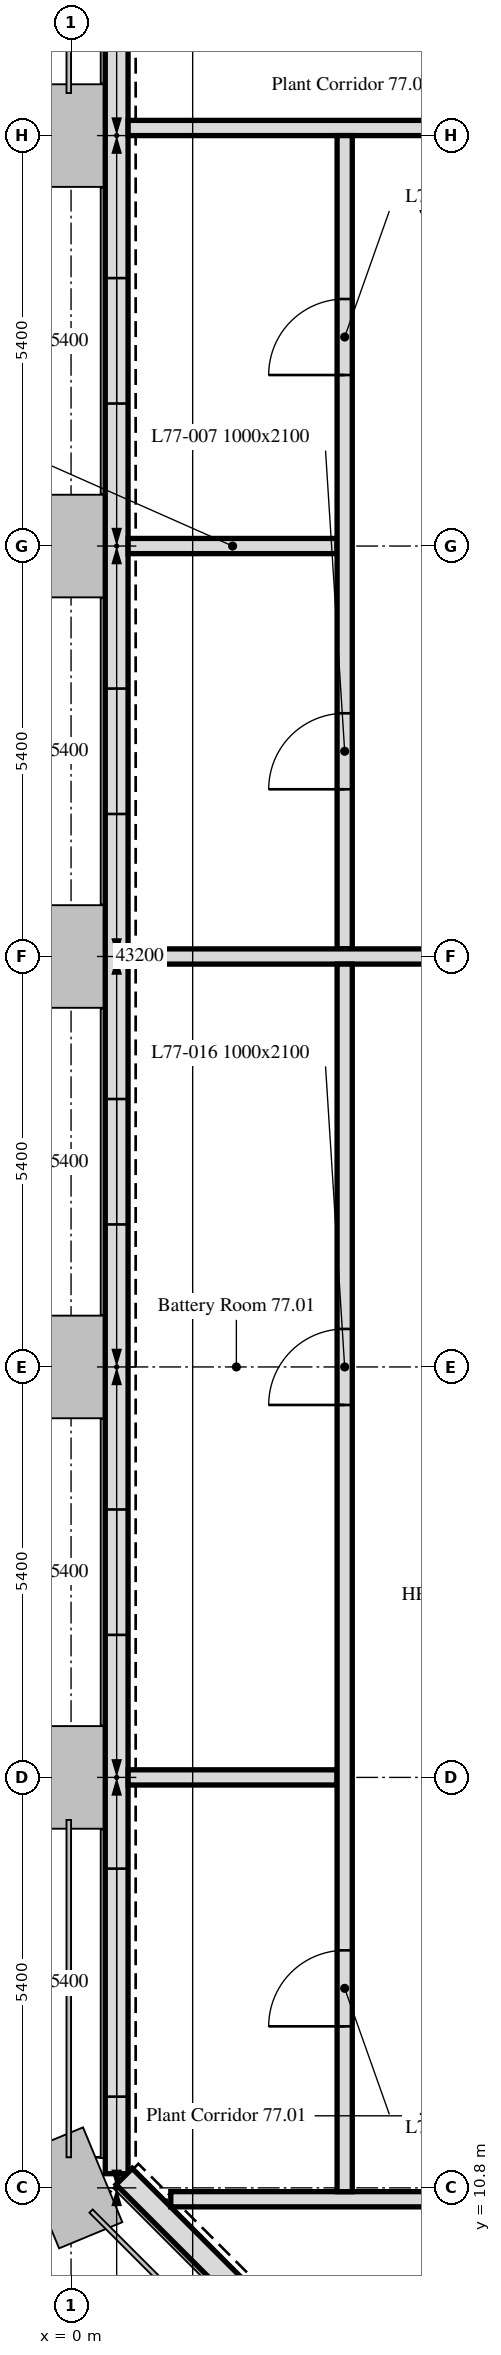
"""IFC4 building model, lengths in metres.
Left out: names, types, materials, properties, quantities, classifications, styles, units other than length and angle.
Written with IfcOpenShell. Run it as: python <this file> out.ifc"""

import sys

from ifc_helpers import new_model, si_unit, direction, frame, frame_2d, origin, place, context, subcontext, project, spatial, polyline, rectangle, outline, extrude, element, fill, save


model = new_model("IFC4")
c1 = context("Model", 3, precision=1e-05, world=origin(), true_north=direction((0.0, 1.0)))
c2 = subcontext(c1, "Body", "Model", "MODEL_VIEW")
j1 = project(units=[si_unit("LENGTHUNIT", "METRE"), si_unit("PLANEANGLEUNIT", "RADIAN")], contexts=[c1])
p1 = place(None, origin())
s1 = spatial("IfcSite", under=j1, at=p1, CompositionType="ELEMENT")
p2 = place(p1, origin())
s2 = spatial("IfcBuilding", under=s1, at=p2, CompositionType="ELEMENT")
p3 = place(p2, frame((0.0, 0.0, 308.2)))
s3 = spatial("IfcBuildingStorey", under=s2, at=p3, CompositionType="ELEMENT", Elevation=308.2)
p4 = place(p3, frame((0.6, 43.014, 0.0), z_axis=(0.0, 0.0, 1.0), x_axis=(0.0, -1.0, 0.0)))
e1 = element("IfcWall", 1, at=p4, inside=s3, PredefinedType="SOLIDWALL", context=c2, shape_type="SweptSolid", body=[
    extrude(outline(polyline([(0.0, 0.0), (32.027, 0.0), (32.027, 4.2), (31.434, 4.2), (30.841, 4.2), (30.248, 4.2), (29.655, 4.2), (29.062, 4.2), (28.469, 4.2), (27.875, 4.2), (27.282, 4.2), (26.689, 4.2), (26.096, 4.2), (25.503, 4.2), (24.91, 4.2), (24.317, 4.2), (23.724, 4.2), (23.131, 4.2), (22.538, 4.2), (21.945, 4.2), (21.352, 4.2), (20.758, 4.2), (20.165, 4.2), (19.572, 4.2), (18.979, 4.2), (18.386, 4.2), (17.793, 4.2), (17.2, 4.2), (16.607, 4.2), (16.014, 4.2), (15.42, 4.2), (14.827, 4.2), (14.234, 4.2), (13.641, 4.2), (13.048, 4.2), (12.455, 4.2), (11.862, 4.2), (11.269, 4.2), (10.676, 4.2), (10.083, 4.2), (9.49, 4.2), (8.896, 4.2), (8.303, 4.2), (7.71, 4.2), (7.117, 4.2), (6.524, 4.2), (5.931, 4.2), (5.338, 4.2), (4.745, 4.2), (4.152, 4.2), (3.559, 4.2), (2.966, 4.2), (2.372, 4.2), (1.779, 4.2), (1.186, 4.2), (0.593, 4.2), (0.0, 4.2), (0.0, 0.0)])), frame((0.0, 0.15, 0.0), z_axis=(0.0, -1.0, 0.0), x_axis=(1.0, 0.0, 0.0)), (0.0, 0.0, 1.0), 0.3),
])
p5 = place(p4, frame((1.014, 0.0, 0.6)))
e2 = element("IfcOpeningElement", 2, at=p5, cuts=e1, PredefinedType="OPENING", context=c2, shape_type="SweptSolid", body=[
    extrude(rectangle(XDim=3.0, YDim=1.8, at=frame_2d((1.5, 0.9))), frame((0.0, 0.16, 0.0), z_axis=(0.0, -1.0, 0.0), x_axis=(1.0, 0.0, 0.0)), (0.0, 0.0, 1.0), 0.32),
])
p6 = place(p4, frame((7.089, 0.0, 0.6)))
e3 = element("IfcOpeningElement", 3, at=p6, cuts=e1, PredefinedType="OPENING", context=c2, shape_type="SweptSolid", body=[
    extrude(rectangle(XDim=1.65, YDim=1.8, at=frame_2d((0.825, 0.9))), frame((0.0, 0.16, 0.0), z_axis=(0.0, -1.0, 0.0), x_axis=(1.0, 0.0, 0.0)), (0.0, 0.0, 1.0), 0.32),
])
p7 = place(p4, frame((12.489, 0.0, 0.6)))
e4 = element("IfcOpeningElement", 4, at=p7, cuts=e1, PredefinedType="OPENING", context=c2, shape_type="SweptSolid", body=[
    extrude(rectangle(XDim=1.65, YDim=1.8, at=frame_2d((0.825, 0.9))), frame((0.0, 0.16, 0.0), z_axis=(0.0, -1.0, 0.0), x_axis=(1.0, 0.0, 0.0)), (0.0, 0.0, 1.0), 0.32),
])
p8 = place(p4, frame((17.889, 0.0, 0.6)))
e5 = element("IfcOpeningElement", 5, at=p8, cuts=e1, PredefinedType="OPENING", context=c2, shape_type="SweptSolid", body=[
    extrude(rectangle(XDim=1.65, YDim=1.8, at=frame_2d((0.825, 0.9))), frame((0.0, 0.16, 0.0), z_axis=(0.0, -1.0, 0.0), x_axis=(1.0, 0.0, 0.0)), (0.0, 0.0, 1.0), 0.32),
])
p9 = place(p4, frame((23.289, 0.0, 0.6)))
e6 = element("IfcOpeningElement", 6, at=p9, cuts=e1, PredefinedType="OPENING", context=c2, shape_type="SweptSolid", body=[
    extrude(rectangle(XDim=1.65, YDim=1.8, at=frame_2d((0.825, 0.9))), frame((0.0, 0.16, 0.0), z_axis=(0.0, -1.0, 0.0), x_axis=(1.0, 0.0, 0.0)), (0.0, 0.0, 1.0), 0.32),
])
p10 = place(p4, frame((28.014, 0.0, 0.6)))
e7 = element("IfcOpeningElement", 7, at=p10, cuts=e1, PredefinedType="OPENING", context=c2, shape_type="SweptSolid", body=[
    extrude(rectangle(XDim=3.0, YDim=1.8, at=frame_2d((1.5, 0.9))), frame((0.0, 0.16, 0.0), z_axis=(0.0, -1.0, 0.0), x_axis=(1.0, 0.0, 0.0)), (0.0, 0.0, 1.0), 0.32),
])
p11 = place(p3, frame((0.699, 10.949, 0.0), z_axis=(0.0, 0.0, 1.0), x_axis=(0.707106781187, -0.707106781187, 0.0)))
e8 = element("IfcWall", 8, at=p11, inside=s3, PredefinedType="SOLIDWALL", context=c2, shape_type="SweptSolid", body=[
    extrude(outline(polyline([(0.0, 0.0), (6.86, 0.0), (6.86, 4.2), (6.288, 4.2), (5.716, 4.2), (5.145, 4.2), (4.573, 4.2), (4.001, 4.2), (3.43, 4.2), (2.858, 4.2), (2.287, 4.2), (1.715, 4.2), (1.143, 4.2), (0.572, 4.2), (0.0, 4.2), (0.0, 0.0)])), frame((0.0, 0.15, 0.0), z_axis=(0.0, -1.0, 0.0), x_axis=(1.0, 0.0, 0.0)), (0.0, 0.0, 1.0), 0.3),
])
p12 = place(p3, frame((0.751, 32.4, 0.0), z_axis=(0.0, 0.0, 1.0), x_axis=(1.0, 0.0, 0.0)))
e9 = element("IfcWall", 9, at=p12, inside=s3, PredefinedType="PARTITIONING", context=c2, shape_type="SweptSolid", body=[
    extrude(rectangle(XDim=2.749, YDim=0.2, at=frame_2d((1.375, 0.0))), origin(), (0.0, 0.0, 1.0), 3.45),
])
p13 = place(p3, frame((5.105, 37.9, 0.0), z_axis=(0.0, 0.0, 1.0), x_axis=(-1.0, 0.0, 0.0)))
e10 = element("IfcWall", 10, at=p13, inside=s3, PredefinedType="PARTITIONING", context=c2, shape_type="SweptSolid", body=[
    extrude(rectangle(XDim=4.354, YDim=0.2, at=frame_2d((2.177, 0.0))), origin(), (0.0, 0.0, 1.0), 3.45),
])
p14 = place(p3, frame((3.6, 27.1, 0.0), z_axis=(0.0, 0.0, 1.0), x_axis=(0.0, 1.0, 0.0)))
e11 = element("IfcWall", 11, at=p14, inside=s3, PredefinedType="PARTITIONING", context=c2, shape_type="SweptSolid", body=[
    extrude(rectangle(XDim=10.7, YDim=0.2, at=frame_2d((5.35, 0.0))), origin(), (0.0, 0.0, 1.0), 3.45),
])
p15 = place(p14, frame((7.55, 0.0, 0.0)))
e12 = element("IfcOpeningElement", 12, at=p15, cuts=e11, PredefinedType="OPENING", context=c2, shape_type="SweptSolid", body=[
    extrude(rectangle(XDim=1.0, YDim=2.1, at=frame_2d((0.5, 1.05))), frame((0.0, 0.1, 0.0), z_axis=(0.0, -1.0, 0.0), x_axis=(1.0, 0.0, 0.0)), (0.0, 0.0, 1.0), 0.2),
])
p16 = place(p14, frame((2.1, 0.0, 0.0)))
e13 = element("IfcOpeningElement", 13, at=p16, cuts=e11, PredefinedType="OPENING", context=c2, shape_type="SweptSolid", body=[
    extrude(rectangle(XDim=1.0, YDim=2.1, at=frame_2d((0.5, 1.05))), frame((0.0, 0.1, 0.0), z_axis=(0.0, -1.0, 0.0), x_axis=(1.0, 0.0, 0.0)), (0.0, 0.0, 1.0), 0.2),
])
p17 = place(p3, frame((0.751, 27.0, 0.0), z_axis=(0.0, 0.0, 1.0), x_axis=(1.0, 0.0, 0.0)))
e14 = element("IfcWall", 14, at=p17, inside=s3, PredefinedType="PARTITIONING", context=c2, shape_type="SweptSolid", body=[
    extrude(rectangle(XDim=4.649, YDim=0.2, at=frame_2d((2.324, 0.0))), origin(), (0.0, 0.0, 1.0), 3.45),
])
p18 = place(p3, frame((3.5, 16.2, 0.0), z_axis=(0.0, 0.0, 1.0), x_axis=(-1.0, 0.0, 0.0)))
e15 = element("IfcWall", 15, at=p18, inside=s3, PredefinedType="PARTITIONING", context=c2, shape_type="SweptSolid", body=[
    extrude(rectangle(XDim=2.749, YDim=0.2, at=frame_2d((1.375, 0.0))), origin(), (0.0, 0.0, 1.0), 3.45),
])
p19 = place(p3, frame((1.312, 10.65, 0.0), z_axis=(0.0, 0.0, 1.0), x_axis=(1.0, 0.0, 0.0)))
e16 = element("IfcWall", 16, at=p19, inside=s3, PredefinedType="PARTITIONING", context=c2, shape_type="SweptSolid", body=[
    extrude(rectangle(XDim=3.793, YDim=0.2, at=frame_2d((1.896, 0.0))), origin(), (0.0, 0.0, 1.0), 4.2),
])
p20 = place(p3, frame((3.6, 10.75, 0.0), z_axis=(0.0, 0.0, 1.0), x_axis=(0.0, 1.0, 0.0)))
e17 = element("IfcWall", 17, at=p20, inside=s3, PredefinedType="PARTITIONING", context=c2, shape_type="SweptSolid", body=[
    extrude(rectangle(XDim=16.15, YDim=0.2, at=frame_2d((8.075, 0.0))), origin(), (0.0, 0.0, 1.0), 3.45),
])
p21 = place(p20, frame((2.175, 0.0, 0.0)))
e18 = element("IfcOpeningElement", 18, at=p21, cuts=e17, PredefinedType="OPENING", context=c2, shape_type="SweptSolid", body=[
    extrude(rectangle(XDim=1.0, YDim=2.1, at=frame_2d((0.5, 1.05))), frame((0.0, 0.1, 0.0), z_axis=(0.0, -1.0, 0.0), x_axis=(1.0, 0.0, 0.0)), (0.0, 0.0, 1.0), 0.2),
])
p22 = place(p20, frame((10.35, 0.0, 0.0)))
e19 = element("IfcOpeningElement", 19, at=p22, cuts=e17, PredefinedType="OPENING", context=c2, shape_type="SweptSolid", body=[
    extrude(rectangle(XDim=1.0, YDim=2.1, at=frame_2d((0.5, 1.05))), frame((0.0, 0.1, 0.0), z_axis=(0.0, -1.0, 0.0), x_axis=(1.0, 0.0, 0.0)), (0.0, 0.0, 1.0), 0.2),
])
p23 = place(p6, origin())
e20 = element("IfcWindow", 20, at=p23, inside=s3, PartitioningType="SINGLE_PANEL", PredefinedType="WINDOW", context=c2, shape_type="SweptSolid", body=[
    extrude(rectangle(XDim=1.65, YDim=1.8, at=frame_2d((0.825, 0.9))), frame((0.0, 0.03, 0.0), z_axis=(0.0, -1.0, 0.0), x_axis=(1.0, 0.0, 0.0)), (0.0, 0.0, 1.0), 0.06),
])
fill(e3, e20)
p24 = place(p7, origin())
e21 = element("IfcWindow", 21, at=p24, inside=s3, PartitioningType="SINGLE_PANEL", PredefinedType="WINDOW", context=c2, shape_type="SweptSolid", body=[
    extrude(rectangle(XDim=1.65, YDim=1.8, at=frame_2d((0.825, 0.9))), frame((0.0, 0.03, 0.0), z_axis=(0.0, -1.0, 0.0), x_axis=(1.0, 0.0, 0.0)), (0.0, 0.0, 1.0), 0.06),
])
fill(e4, e21)
p25 = place(p8, origin())
e22 = element("IfcWindow", 22, at=p25, inside=s3, PartitioningType="SINGLE_PANEL", PredefinedType="WINDOW", context=c2, shape_type="SweptSolid", body=[
    extrude(rectangle(XDim=1.65, YDim=1.8, at=frame_2d((0.825, 0.9))), frame((0.0, 0.03, 0.0), z_axis=(0.0, -1.0, 0.0), x_axis=(1.0, 0.0, 0.0)), (0.0, 0.0, 1.0), 0.06),
])
fill(e5, e22)
p26 = place(p9, origin())
e23 = element("IfcWindow", 23, at=p26, inside=s3, PartitioningType="SINGLE_PANEL", PredefinedType="WINDOW", context=c2, shape_type="SweptSolid", body=[
    extrude(rectangle(XDim=1.65, YDim=1.8, at=frame_2d((0.825, 0.9))), frame((0.0, 0.03, 0.0), z_axis=(0.0, -1.0, 0.0), x_axis=(1.0, 0.0, 0.0)), (0.0, 0.0, 1.0), 0.06),
])
fill(e6, e23)
p27 = place(p10, origin())
e24 = element("IfcWindow", 24, at=p27, inside=s3, PartitioningType="SINGLE_PANEL", PredefinedType="WINDOW", context=c2, shape_type="SweptSolid", body=[
    extrude(rectangle(XDim=3.0, YDim=1.8, at=frame_2d((1.5, 0.9))), frame((0.0, 0.03, 0.0), z_axis=(0.0, -1.0, 0.0), x_axis=(1.0, 0.0, 0.0)), (0.0, 0.0, 1.0), 0.06),
])
fill(e7, e24)
p28 = place(p15, origin())
e25 = element("IfcDoor", 25, at=p28, inside=s3, OperationType="SINGLE_SWING_LEFT", PredefinedType="DOOR", context=c2, shape_type="SweptSolid", body=[
    extrude(rectangle(XDim=1.0, YDim=2.1, at=frame_2d((0.5, 1.05))), frame((0.0, 0.025, 0.0), z_axis=(0.0, -1.0, 0.0), x_axis=(1.0, 0.0, 0.0)), (0.0, 0.0, 1.0), 0.05),
])
fill(e12, e25)
p29 = place(p16, origin())
e26 = element("IfcDoor", 26, at=p29, inside=s3, OperationType="SINGLE_SWING_RIGHT", PredefinedType="DOOR", context=c2, shape_type="SweptSolid", body=[
    extrude(rectangle(XDim=1.0, YDim=2.1, at=frame_2d((0.5, 1.05))), frame((0.0, 0.025, 0.0), z_axis=(0.0, -1.0, 0.0), x_axis=(1.0, 0.0, 0.0)), (0.0, 0.0, 1.0), 0.05),
])
fill(e13, e26)
p30 = place(p21, origin())
e27 = element("IfcDoor", 27, at=p30, inside=s3, OperationType="SINGLE_SWING_LEFT", PredefinedType="DOOR", context=c2, shape_type="SweptSolid", body=[
    extrude(rectangle(XDim=1.0, YDim=2.1, at=frame_2d((0.5, 1.05))), frame((0.0, 0.025, 0.0), z_axis=(0.0, -1.0, 0.0), x_axis=(1.0, 0.0, 0.0)), (0.0, 0.0, 1.0), 0.05),
])
fill(e18, e27)
p31 = place(p22, origin())
e28 = element("IfcDoor", 28, at=p31, inside=s3, OperationType="SINGLE_SWING_RIGHT", PredefinedType="DOOR", context=c2, shape_type="SweptSolid", body=[
    extrude(rectangle(XDim=1.0, YDim=2.1, at=frame_2d((0.5, 1.05))), frame((0.0, 0.025, 0.0), z_axis=(0.0, -1.0, 0.0), x_axis=(1.0, 0.0, 0.0)), (0.0, 0.0, 1.0), 0.05),
])
fill(e19, e28)
save(model, sys.argv[1])
